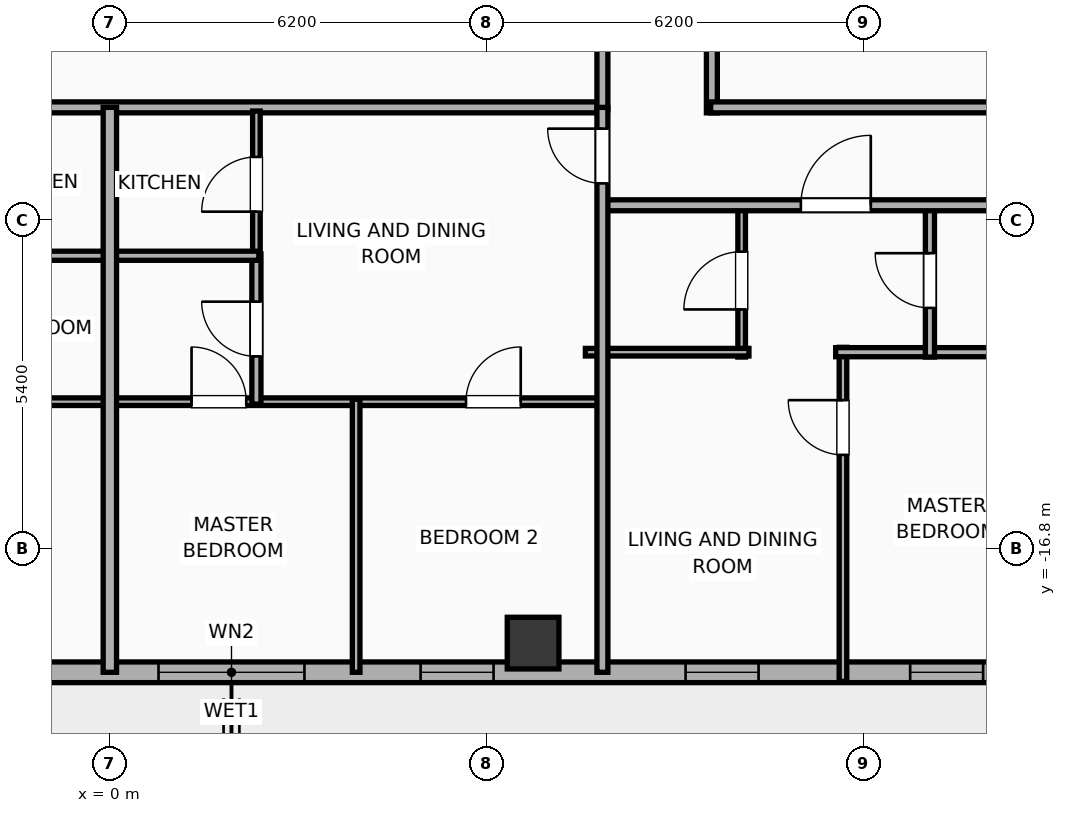
"""IFC4 building model, lengths in metres.
Left out: names, types, materials, properties, quantities, classifications, styles, units other than length and angle.
Written with IfcOpenShell. Run it as: python <this file> out.ifc"""

import sys

from ifc_helpers import new_model, si_unit, direction, frame, frame_2d, origin, origin_2d, place, context, subcontext, project, spatial, rectangle, hollow_rectangle, extrude, element, fill, save


model = new_model("IFC4")
c1 = context("Model", 3, precision=1e-05, world=origin(), true_north=direction((0.0, 1.0)))
c2 = subcontext(c1, "Body", "Model", "MODEL_VIEW")
j1 = project(units=[si_unit("LENGTHUNIT", "METRE"), si_unit("PLANEANGLEUNIT", "RADIAN")], contexts=[c1])
p1 = place(None, origin())
s1 = spatial("IfcSite", under=j1, at=p1, CompositionType="ELEMENT")
p2 = place(p1, origin())
s2 = spatial("IfcBuilding", under=s1, at=p2, CompositionType="ELEMENT")
p3 = place(p2, frame((0.0, 0.0, 231.4)))
s3 = spatial("IfcBuildingStorey", under=s2, at=p3, CompositionType="ELEMENT", Elevation=231.4)
p4 = place(p3, frame((6.96, -18.35, 0.0), z_axis=(0.0, 0.0, 1.0), x_axis=(1.0, 0.0, 0.0)))
e1 = element("IfcColumn", 1, at=p4, inside=s3, PredefinedType="COLUMN", context=c2, shape_type="SweptSolid", body=[
    extrude(hollow_rectangle(XDim=0.85, YDim=0.85, WallThickness=0.028, at=origin_2d()), origin(), (0.0, 0.0, 1.0), 3.9),
])
p5 = place(p3, frame((26.783, -18.83, 0.0), z_axis=(0.0, 0.0, 1.0), x_axis=(-1.0, 0.0, 0.0)))
e2 = element("IfcWall", 2, at=p5, inside=s3, PredefinedType="ELEMENTEDWALL", context=c2, shape_type="SweptSolid", body=[
    extrude(rectangle(XDim=49.566, YDim=0.34, at=frame_2d((24.783, 0.0))), origin(), (0.0, 0.0, 1.0), 3.65),
])
p6 = place(p5, frame((23.583, 0.0, 0.75)))
e3 = element("IfcOpeningElement", 3, at=p6, cuts=e2, PredefinedType="OPENING", context=c2, shape_type="SweptSolid", body=[
    extrude(rectangle(XDim=2.4, YDim=2.1, at=frame_2d((1.2, 1.05))), frame((0.0, 0.18, 0.0), z_axis=(0.0, -1.0, 0.0), x_axis=(1.0, 0.0, 0.0)), (0.0, 0.0, 1.0), 0.36),
])
p7 = place(p5, frame((41.756, 0.0, 0.75)))
e4 = element("IfcOpeningElement", 4, at=p7, cuts=e2, PredefinedType="OPENING", context=c2, shape_type="SweptSolid", body=[
    extrude(rectangle(XDim=2.4, YDim=2.1, at=frame_2d((1.2, 1.05))), frame((0.0, 0.18, 0.0), z_axis=(0.0, -1.0, 0.0), x_axis=(1.0, 0.0, 0.0)), (0.0, 0.0, 1.0), 0.36),
])
p8 = place(p5, frame((47.222, 0.0, 0.75)))
e5 = element("IfcOpeningElement", 5, at=p8, cuts=e2, PredefinedType="OPENING", context=c2, shape_type="SweptSolid", body=[
    extrude(rectangle(XDim=1.2, YDim=2.05, at=frame_2d((0.6, 1.025))), frame((0.0, 0.18, 0.0), z_axis=(0.0, -1.0, 0.0), x_axis=(1.0, 0.0, 0.0)), (0.0, 0.0, 1.0), 0.36),
])
p9 = place(p5, frame((45.263, 0.0, 0.75)))
e6 = element("IfcOpeningElement", 6, at=p9, cuts=e2, PredefinedType="OPENING", context=c2, shape_type="SweptSolid", body=[
    extrude(rectangle(XDim=1.2, YDim=2.05, at=frame_2d((0.6, 1.025))), frame((0.0, 0.18, 0.0), z_axis=(0.0, -1.0, 0.0), x_axis=(1.0, 0.0, 0.0)), (0.0, 0.0, 1.0), 0.36),
])
p10 = place(p5, frame((37.289, 0.0, 0.75)))
e7 = element("IfcOpeningElement", 7, at=p10, cuts=e2, PredefinedType="OPENING", context=c2, shape_type="SweptSolid", body=[
    extrude(rectangle(XDim=1.2, YDim=2.05, at=frame_2d((0.6, 1.025))), frame((0.0, 0.18, 0.0), z_axis=(0.0, -1.0, 0.0), x_axis=(1.0, 0.0, 0.0)), (0.0, 0.0, 1.0), 0.36),
])
p11 = place(p5, frame((16.115, 0.0, 0.75)))
e8 = element("IfcOpeningElement", 8, at=p11, cuts=e2, PredefinedType="OPENING", context=c2, shape_type="SweptSolid", body=[
    extrude(rectangle(XDim=1.2, YDim=2.05, at=frame_2d((0.6, 1.025))), frame((0.0, 0.18, 0.0), z_axis=(0.0, -1.0, 0.0), x_axis=(1.0, 0.0, 0.0)), (0.0, 0.0, 1.0), 0.36),
])
p12 = place(p5, frame((12.422, 0.0, 0.75)))
e9 = element("IfcOpeningElement", 9, at=p12, cuts=e2, PredefinedType="OPENING", context=c2, shape_type="SweptSolid", body=[
    extrude(rectangle(XDim=1.2, YDim=2.05, at=frame_2d((0.6, 1.025))), frame((0.0, 0.18, 0.0), z_axis=(0.0, -1.0, 0.0), x_axis=(1.0, 0.0, 0.0)), (0.0, 0.0, 1.0), 0.36),
])
p13 = place(p5, frame((8.01, 0.0, 0.75)))
e10 = element("IfcOpeningElement", 10, at=p13, cuts=e2, PredefinedType="OPENING", context=c2, shape_type="SweptSolid", body=[
    extrude(rectangle(XDim=1.2, YDim=2.05, at=frame_2d((0.6, 1.025))), frame((0.0, 0.18, 0.0), z_axis=(0.0, -1.0, 0.0), x_axis=(1.0, 0.0, 0.0)), (0.0, 0.0, 1.0), 0.36),
])
p14 = place(p5, frame((5.037, 0.0, 0.75)))
e11 = element("IfcOpeningElement", 11, at=p14, cuts=e2, PredefinedType="OPENING", context=c2, shape_type="SweptSolid", body=[
    extrude(rectangle(XDim=1.2, YDim=2.05, at=frame_2d((0.6, 1.025))), frame((0.0, 0.18, 0.0), z_axis=(0.0, -1.0, 0.0), x_axis=(1.0, 0.0, 0.0)), (0.0, 0.0, 1.0), 0.36),
])
p15 = place(p5, frame((1.811, 0.0, 0.75)))
e12 = element("IfcOpeningElement", 12, at=p15, cuts=e2, PredefinedType="OPENING", context=c2, shape_type="SweptSolid", body=[
    extrude(rectangle(XDim=1.2, YDim=2.05, at=frame_2d((0.6, 1.025))), frame((0.0, 0.18, 0.0), z_axis=(0.0, -1.0, 0.0), x_axis=(1.0, 0.0, 0.0)), (0.0, 0.0, 1.0), 0.36),
])
p16 = place(p5, frame((32.253, 0.0, 0.75)))
e13 = element("IfcOpeningElement", 13, at=p16, cuts=e2, PredefinedType="OPENING", context=c2, shape_type="SweptSolid", body=[
    extrude(rectangle(XDim=1.2, YDim=2.05, at=frame_2d((0.6, 1.025))), frame((0.0, 0.18, 0.0), z_axis=(0.0, -1.0, 0.0), x_axis=(1.0, 0.0, 0.0)), (0.0, 0.0, 1.0), 0.36),
])
p17 = place(p5, frame((27.853, 0.0, 0.75)))
e14 = element("IfcOpeningElement", 14, at=p17, cuts=e2, PredefinedType="OPENING", context=c2, shape_type="SweptSolid", body=[
    extrude(rectangle(XDim=1.2, YDim=2.05, at=frame_2d((0.6, 1.025))), frame((0.0, 0.18, 0.0), z_axis=(0.0, -1.0, 0.0), x_axis=(1.0, 0.0, 0.0)), (0.0, 0.0, 1.0), 0.36),
])
p18 = place(p5, frame((20.473, 0.0, 0.75)))
e15 = element("IfcOpeningElement", 15, at=p18, cuts=e2, PredefinedType="OPENING", context=c2, shape_type="SweptSolid", body=[
    extrude(rectangle(XDim=1.2, YDim=2.05, at=frame_2d((0.6, 1.025))), frame((0.0, 0.18, 0.0), z_axis=(0.0, -1.0, 0.0), x_axis=(1.0, 0.0, 0.0)), (0.0, 0.0, 1.0), 0.36),
])
p19 = place(p3, frame((9.9, -9.63, 0.0), z_axis=(0.0, 0.0, 1.0), x_axis=(0.0, 1.0, 0.0)))
e16 = element("IfcWall", 16, at=p19, inside=s3, PredefinedType="PARTITIONING", context=c2, shape_type="SweptSolid", body=[
    extrude(rectangle(XDim=19.26, YDim=0.18, at=frame_2d((9.63, 0.0))), origin(), (0.0, 0.0, 1.0), 3.65),
])
p20 = place(p19, frame((8.117, 0.0, 0.0)))
e17 = element("IfcOpeningElement", 17, at=p20, cuts=e16, PredefinedType="OPENING", context=c2, shape_type="SweptSolid", body=[
    extrude(rectangle(XDim=1.1, YDim=2.05, at=frame_2d((0.55, 1.025))), frame((0.0, 0.1, 0.0), z_axis=(0.0, -1.0, 0.0), x_axis=(1.0, 0.0, 0.0)), (0.0, 0.0, 1.0), 0.2),
])
p21 = place(p3, frame((9.88, -9.54, 0.0), z_axis=(0.0, 0.0, 1.0), x_axis=(1.0, 0.0, 0.0)))
e18 = element("IfcWall", 18, at=p21, inside=s3, PredefinedType="PARTITIONING", context=c2, shape_type="SweptSolid", body=[
    extrude(rectangle(XDim=20.35, YDim=0.18, at=frame_2d((10.175, 0.0))), origin(), (0.0, 0.0, 1.0), 3.65),
])
p22 = place(p3, frame((-8.15, -9.54, 0.0), z_axis=(0.0, 0.0, 1.0), x_axis=(1.0, 0.0, 0.0)))
e19 = element("IfcWall", 19, at=p22, inside=s3, PredefinedType="PARTITIONING", context=c2, shape_type="SweptSolid", body=[
    extrude(rectangle(XDim=16.3, YDim=0.18, at=frame_2d((8.15, 0.0))), origin(), (0.0, 0.0, 1.0), 3.65),
])
p23 = place(p3, frame((8.1, -9.58, 0.0), z_axis=(0.0, 0.0, 1.0), x_axis=(0.0, 1.0, 0.0)))
e20 = element("IfcWall", 20, at=p23, inside=s3, PredefinedType="PARTITIONING", context=c2, shape_type="SweptSolid", body=[
    extrude(rectangle(XDim=19.16, YDim=0.18, at=frame_2d((9.58, 0.0))), origin(), (0.0, 0.0, 1.0), 3.65),
])
p24 = place(p3, frame((12.056, -18.98, 0.0), z_axis=(0.0, 0.0, 1.0), x_axis=(0.0, 1.0, 0.0)))
e21 = element("IfcWall", 21, at=p24, inside=s3, PredefinedType="PARTITIONING", context=c2, shape_type="SweptSolid", body=[
    extrude(rectangle(XDim=5.494, YDim=0.125, at=frame_2d((2.747, 0.0))), origin(), (0.0, 0.0, 1.0), 3.65),
])
p25 = place(p24, frame((3.725, 0.0, 0.0)))
e22 = element("IfcOpeningElement", 22, at=p25, cuts=e21, PredefinedType="OPENING", context=c2, shape_type="SweptSolid", body=[
    extrude(rectangle(XDim=0.9, YDim=2.05, at=frame_2d((0.45, 1.025))), frame((0.0, 0.073, 0.0), z_axis=(0.0, -1.0, 0.0), x_axis=(1.0, 0.0, 0.0)), (0.0, 0.0, 1.0), 0.145),
])
p26 = place(p3, frame((11.936, -13.566, 0.0), z_axis=(0.0, 0.0, 1.0), x_axis=(1.0, 0.0, 0.0)))
e23 = element("IfcWall", 23, at=p26, inside=s3, PredefinedType="PLUMBINGWALL", context=c2, shape_type="SweptSolid", body=[
    extrude(rectangle(XDim=3.79, YDim=0.15, at=frame_2d((1.895, 0.0))), origin(), (0.0, 0.0, 1.0), 3.65),
])
p27 = place(p3, frame((10.39, -13.646, 0.0), z_axis=(0.0, 0.0, 1.0), x_axis=(0.0, 1.0, 0.0)))
e24 = element("IfcWall", 24, at=p27, inside=s3, PredefinedType="PARTITIONING", context=c2, shape_type="SweptSolid", body=[
    extrude(rectangle(XDim=2.516, YDim=0.125, at=frame_2d((1.258, 0.0))), origin(), (0.0, 0.0, 1.0), 3.65),
])
p28 = place(p27, frame((0.783, 0.0, 0.0)))
e25 = element("IfcOpeningElement", 25, at=p28, cuts=e24, PredefinedType="OPENING", context=c2, shape_type="SweptSolid", body=[
    extrude(rectangle(XDim=0.95, YDim=2.05, at=frame_2d((0.475, 1.025))), frame((0.0, 0.073, 0.0), z_axis=(0.0, -1.0, 0.0), x_axis=(1.0, 0.0, 0.0)), (0.0, 0.0, 1.0), 0.145),
])
p29 = place(p3, frame((7.82, -13.566, 0.0), z_axis=(0.0, 0.0, 1.0), x_axis=(1.0, 0.0, 0.0)))
e26 = element("IfcWall", 26, at=p29, inside=s3, PredefinedType="PARTITIONING", context=c2, shape_type="SweptSolid", body=[
    extrude(rectangle(XDim=2.69, YDim=0.125, at=frame_2d((1.345, 0.0))), origin(), (0.0, 0.0, 1.0), 3.65),
])
p30 = place(p3, frame((13.486, -13.646, 0.0), z_axis=(0.0, 0.0, 1.0), x_axis=(0.0, 1.0, 0.0)))
e27 = element("IfcWall", 27, at=p30, inside=s3, PredefinedType="PLUMBINGWALL", context=c2, shape_type="SweptSolid", body=[
    extrude(rectangle(XDim=2.516, YDim=0.15, at=frame_2d((1.258, 0.0))), origin(), (0.0, 0.0, 1.0), 3.65),
])
p31 = place(p30, frame((0.808, 0.0, 0.0)))
e28 = element("IfcOpeningElement", 28, at=p31, cuts=e27, PredefinedType="OPENING", context=c2, shape_type="SweptSolid", body=[
    extrude(rectangle(XDim=0.9, YDim=2.05, at=frame_2d((0.45, 1.025))), frame((0.0, 0.085, 0.0), z_axis=(0.0, -1.0, 0.0), x_axis=(1.0, 0.0, 0.0)), (0.0, 0.0, 1.0), 0.17),
])
p32 = place(p3, frame((8.08, -11.15, 0.0), z_axis=(0.0, 0.0, 1.0), x_axis=(1.0, 0.0, 0.0)))
e29 = element("IfcWall", 29, at=p32, inside=s3, PredefinedType="PARTITIONING", context=c2, shape_type="SweptSolid", body=[
    extrude(rectangle(XDim=22.15, YDim=0.18, at=frame_2d((11.075, 0.0))), origin(), (0.0, 0.0, 1.0), 3.65),
])
p33 = place(p32, frame((3.283, 0.0, 0.0)))
e30 = element("IfcOpeningElement", 30, at=p33, cuts=e29, PredefinedType="OPENING", context=c2, shape_type="SweptSolid", body=[
    extrude(rectangle(XDim=1.15, YDim=2.05, at=frame_2d((0.575, 1.025))), frame((0.0, 0.1, 0.0), z_axis=(0.0, -1.0, 0.0), x_axis=(1.0, 0.0, 0.0)), (0.0, 0.0, 1.0), 0.2),
])
p34 = place(p32, frame((10.668, 0.0, 0.0)))
e31 = element("IfcOpeningElement", 31, at=p34, cuts=e29, PredefinedType="OPENING", context=c2, shape_type="SweptSolid", body=[
    extrude(rectangle(XDim=1.15, YDim=2.05, at=frame_2d((0.575, 1.025))), frame((0.0, 0.1, 0.0), z_axis=(0.0, -1.0, 0.0), x_axis=(1.0, 0.0, 0.0)), (0.0, 0.0, 1.0), 0.2),
])
p35 = place(p32, frame((18.084, 0.0, 0.0)))
e32 = element("IfcOpeningElement", 32, at=p35, cuts=e29, PredefinedType="OPENING", context=c2, shape_type="SweptSolid", body=[
    extrude(rectangle(XDim=1.15, YDim=2.05, at=frame_2d((0.575, 1.025))), frame((0.0, 0.1, 0.0), z_axis=(0.0, -1.0, 0.0), x_axis=(1.0, 0.0, 0.0)), (0.0, 0.0, 1.0), 0.2),
])
p36 = place(p3, frame((-8.08, -14.38, 0.0), z_axis=(0.0, 0.0, 1.0), x_axis=(1.0, 0.0, 0.0)))
e33 = element("IfcWall", 33, at=p36, inside=s3, PredefinedType="PARTITIONING", context=c2, shape_type="SweptSolid", body=[
    extrude(rectangle(XDim=8.06, YDim=0.125, at=frame_2d((4.03, 0.0))), origin(), (0.0, 0.0, 1.0), 3.65),
])
p37 = place(p36, frame((1.323, 0.0, 0.0)))
e34 = element("IfcOpeningElement", 34, at=p37, cuts=e33, PredefinedType="OPENING", context=c2, shape_type="SweptSolid", body=[
    extrude(rectangle(XDim=0.9, YDim=2.05, at=frame_2d((0.45, 1.025))), frame((0.0, 0.073, 0.0), z_axis=(0.0, -1.0, 0.0), x_axis=(1.0, 0.0, 0.0)), (0.0, 0.0, 1.0), 0.145),
])
p38 = place(p36, frame((4.547, 0.0, 0.0)))
e35 = element("IfcOpeningElement", 35, at=p38, cuts=e33, PredefinedType="OPENING", context=c2, shape_type="SweptSolid", body=[
    extrude(rectangle(XDim=0.9, YDim=2.05, at=frame_2d((0.45, 1.025))), frame((0.0, 0.073, 0.0), z_axis=(0.0, -1.0, 0.0), x_axis=(1.0, 0.0, 0.0)), (0.0, 0.0, 1.0), 0.145),
])
p39 = place(p3, frame((-2.45, -11.98, 0.0), z_axis=(0.0, 0.0, 1.0), x_axis=(1.0, 0.0, 0.0)))
e36 = element("IfcWall", 36, at=p39, inside=s3, PredefinedType="PLUMBINGWALL", context=c2, shape_type="SweptSolid", body=[
    extrude(rectangle(XDim=2.43, YDim=0.15, at=frame_2d((1.215, 0.0))), origin(), (0.0, 0.0, 1.0), 3.65),
])
p40 = place(p3, frame((0.02, -14.38, 0.0), z_axis=(0.0, 0.0, 1.0), x_axis=(1.0, 0.0, 0.0)))
e37 = element("IfcWall", 37, at=p40, inside=s3, PredefinedType="PARTITIONING", context=c2, shape_type="SweptSolid", body=[
    extrude(rectangle(XDim=8.06, YDim=0.125, at=frame_2d((4.03, 0.0))), origin(), (0.0, 0.0, 1.0), 3.65),
])
p41 = place(p40, frame((1.323, 0.0, 0.0)))
e38 = element("IfcOpeningElement", 38, at=p41, cuts=e37, PredefinedType="OPENING", context=c2, shape_type="SweptSolid", body=[
    extrude(rectangle(XDim=0.9, YDim=2.05, at=frame_2d((0.45, 1.025))), frame((0.0, 0.073, 0.0), z_axis=(0.0, -1.0, 0.0), x_axis=(1.0, 0.0, 0.0)), (0.0, 0.0, 1.0), 0.145),
])
p42 = place(p40, frame((5.837, 0.0, 0.0)))
e39 = element("IfcOpeningElement", 39, at=p42, cuts=e37, PredefinedType="OPENING", context=c2, shape_type="SweptSolid", body=[
    extrude(rectangle(XDim=0.9, YDim=2.05, at=frame_2d((0.45, 1.025))), frame((0.0, 0.073, 0.0), z_axis=(0.0, -1.0, 0.0), x_axis=(1.0, 0.0, 0.0)), (0.0, 0.0, 1.0), 0.145),
])
p43 = place(p3, frame((2.41, -12.01, 0.0), z_axis=(0.0, 0.0, 1.0), x_axis=(0.0, 1.0, 0.0)))
e40 = element("IfcWall", 40, at=p43, inside=s3, PredefinedType="PARTITIONING", context=c2, shape_type="SweptSolid", body=[
    extrude(rectangle(XDim=2.41, YDim=0.125, at=frame_2d((1.205, 0.0))), origin(), (0.0, 0.0, 1.0), 3.65),
])
p44 = place(p43, frame((0.755, 0.0, 0.0)))
e41 = element("IfcOpeningElement", 41, at=p44, cuts=e40, PredefinedType="OPENING", context=c2, shape_type="SweptSolid", body=[
    extrude(rectangle(XDim=0.9, YDim=2.05, at=frame_2d((0.45, 1.025))), frame((0.0, 0.073, 0.0), z_axis=(0.0, -1.0, 0.0), x_axis=(1.0, 0.0, 0.0)), (0.0, 0.0, 1.0), 0.145),
])
p45 = place(p3, frame((2.41, -14.42, 0.0), z_axis=(0.0, 0.0, 1.0), x_axis=(0.0, 1.0, 0.0)))
e42 = element("IfcWall", 42, at=p45, inside=s3, PredefinedType="PLUMBINGWALL", context=c2, shape_type="SweptSolid", body=[
    extrude(rectangle(XDim=2.47, YDim=0.15, at=frame_2d((1.235, 0.0))), origin(), (0.0, 0.0, 1.0), 3.65),
])
p46 = place(p45, frame((0.785, 0.0, 0.0)))
e43 = element("IfcOpeningElement", 43, at=p46, cuts=e42, PredefinedType="OPENING", context=c2, shape_type="SweptSolid", body=[
    extrude(rectangle(XDim=0.9, YDim=2.05, at=frame_2d((0.45, 1.025))), frame((0.0, 0.085, 0.0), z_axis=(0.0, -1.0, 0.0), x_axis=(1.0, 0.0, 0.0)), (0.0, 0.0, 1.0), 0.17),
])
p47 = place(p3, frame((0.02, -11.98, 0.0), z_axis=(0.0, 0.0, 1.0), x_axis=(1.0, 0.0, 0.0)))
e44 = element("IfcWall", 44, at=p47, inside=s3, PredefinedType="PLUMBINGWALL", context=c2, shape_type="SweptSolid", body=[
    extrude(rectangle(XDim=2.43, YDim=0.15, at=frame_2d((1.215, 0.0))), origin(), (0.0, 0.0, 1.0), 3.65),
])
p48 = place(p3, frame((4.05, -18.83, 0.0), z_axis=(0.0, 0.0, 1.0), x_axis=(0.0, 1.0, 0.0)))
e45 = element("IfcWall", 45, at=p48, inside=s3, PredefinedType="PARTITIONING", context=c2, shape_type="SweptSolid", body=[
    extrude(rectangle(XDim=4.49, YDim=0.125, at=frame_2d((2.245, 0.0))), origin(), (0.0, 0.0, 1.0), 3.65),
])
p49 = place(p3, frame((8.1, -18.83, 0.0), z_axis=(0.0, 0.0, 1.0), x_axis=(0.0, 1.0, 0.0)))
e46 = element("IfcWall", 46, at=p49, inside=s3, PredefinedType="PARTITIONING", context=c2, shape_type="SweptSolid", body=[
    extrude(rectangle(XDim=9.29, YDim=0.18, at=frame_2d((4.645, 0.0))), origin(), (0.0, 0.0, 1.0), 3.65),
])
p50 = place(p49, frame((8.04, 0.0, 0.0)))
e47 = element("IfcOpeningElement", 47, at=p50, cuts=e46, PredefinedType="OPENING", context=c2, shape_type="SweptSolid", body=[
    extrude(rectangle(XDim=0.9, YDim=2.05, at=frame_2d((0.45, 1.025))), frame((0.0, 0.1, 0.0), z_axis=(0.0, -1.0, 0.0), x_axis=(1.0, 0.0, 0.0)), (0.0, 0.0, 1.0), 0.2),
])
p51 = place(p3, frame((0.0, -18.83, 0.0), z_axis=(0.0, 0.0, 1.0), x_axis=(0.0, 1.0, 0.0)))
e48 = element("IfcWall", 48, at=p51, inside=s3, PredefinedType="PARTITIONING", context=c2, shape_type="SweptSolid", body=[
    extrude(rectangle(XDim=9.29, YDim=0.22, at=frame_2d((4.645, 0.0))), origin(), (0.0, 0.0, 1.0), 3.65),
])
p52 = place(p6, origin())
e49 = element("IfcWindow", 49, at=p52, inside=s3, PartitioningType="SINGLE_PANEL", PredefinedType="WINDOW", context=c2, shape_type="SweptSolid", body=[
    extrude(rectangle(XDim=2.4, YDim=2.1, at=frame_2d((1.2, 1.05))), frame((0.0, 0.03, 0.0), z_axis=(0.0, -1.0, 0.0), x_axis=(1.0, 0.0, 0.0)), (0.0, 0.0, 1.0), 0.06),
])
fill(e3, e49)
p53 = place(p11, origin())
e50 = element("IfcWindow", 50, at=p53, inside=s3, PartitioningType="SINGLE_PANEL", PredefinedType="WINDOW", context=c2, shape_type="SweptSolid", body=[
    extrude(rectangle(XDim=1.2, YDim=2.05, at=frame_2d((0.6, 1.025))), frame((0.0, 0.03, 0.0), z_axis=(0.0, -1.0, 0.0), x_axis=(1.0, 0.0, 0.0)), (0.0, 0.0, 1.0), 0.06),
])
fill(e8, e50)
p54 = place(p12, origin())
e51 = element("IfcWindow", 51, at=p54, inside=s3, PartitioningType="SINGLE_PANEL", PredefinedType="WINDOW", context=c2, shape_type="SweptSolid", body=[
    extrude(rectangle(XDim=1.2, YDim=2.05, at=frame_2d((0.6, 1.025))), frame((0.0, 0.03, 0.0), z_axis=(0.0, -1.0, 0.0), x_axis=(1.0, 0.0, 0.0)), (0.0, 0.0, 1.0), 0.06),
])
fill(e9, e51)
p55 = place(p18, origin())
e52 = element("IfcWindow", 52, at=p55, inside=s3, PartitioningType="SINGLE_PANEL", PredefinedType="WINDOW", context=c2, shape_type="SweptSolid", body=[
    extrude(rectangle(XDim=1.2, YDim=2.05, at=frame_2d((0.6, 1.025))), frame((0.0, 0.03, 0.0), z_axis=(0.0, -1.0, 0.0), x_axis=(1.0, 0.0, 0.0)), (0.0, 0.0, 1.0), 0.06),
])
fill(e15, e52)
p56 = place(p25, origin())
e53 = element("IfcDoor", 53, at=p56, inside=s3, OperationType="SINGLE_SWING_RIGHT", PredefinedType="DOOR", context=c2, shape_type="SweptSolid", body=[
    extrude(rectangle(XDim=0.9, YDim=2.05, at=frame_2d((0.45, 1.025))), frame((0.0, 0.025, 0.0), z_axis=(0.0, -1.0, 0.0), x_axis=(1.0, 0.0, 0.0)), (0.0, 0.0, 1.0), 0.05),
])
fill(e22, e53)
p57 = place(p28, origin())
e54 = element("IfcDoor", 54, at=p57, inside=s3, OperationType="SINGLE_SWING_LEFT", PredefinedType="DOOR", context=c2, shape_type="SweptSolid", body=[
    extrude(rectangle(XDim=0.95, YDim=2.05, at=frame_2d((0.475, 1.025))), frame((0.0, 0.025, 0.0), z_axis=(0.0, -1.0, 0.0), x_axis=(1.0, 0.0, 0.0)), (0.0, 0.0, 1.0), 0.05),
])
fill(e25, e54)
p58 = place(p31, origin())
e55 = element("IfcDoor", 55, at=p58, inside=s3, OperationType="SINGLE_SWING_RIGHT", PredefinedType="DOOR", context=c2, shape_type="SweptSolid", body=[
    extrude(rectangle(XDim=0.9, YDim=2.05, at=frame_2d((0.45, 1.025))), frame((0.0, 0.025, 0.0), z_axis=(0.0, -1.0, 0.0), x_axis=(1.0, 0.0, 0.0)), (0.0, 0.0, 1.0), 0.05),
])
fill(e28, e55)
p59 = place(p33, origin())
e56 = element("IfcDoor", 56, at=p59, inside=s3, OperationType="SINGLE_SWING_RIGHT", PredefinedType="DOOR", context=c2, shape_type="SweptSolid", body=[
    extrude(rectangle(XDim=1.15, YDim=2.05, at=frame_2d((0.575, 1.025))), frame((0.0, 0.025, 0.0), z_axis=(0.0, -1.0, 0.0), x_axis=(1.0, 0.0, 0.0)), (0.0, 0.0, 1.0), 0.05),
])
fill(e30, e56)
p60 = place(p41, origin())
e57 = element("IfcDoor", 57, at=p60, inside=s3, OperationType="SINGLE_SWING_LEFT", PredefinedType="DOOR", context=c2, shape_type="SweptSolid", body=[
    extrude(rectangle(XDim=0.9, YDim=2.05, at=frame_2d((0.45, 1.025))), frame((0.0, 0.025, 0.0), z_axis=(0.0, -1.0, 0.0), x_axis=(1.0, 0.0, 0.0)), (0.0, 0.0, 1.0), 0.05),
])
fill(e38, e57)
p61 = place(p42, origin())
e58 = element("IfcDoor", 58, at=p61, inside=s3, OperationType="SINGLE_SWING_RIGHT", PredefinedType="DOOR", context=c2, shape_type="SweptSolid", body=[
    extrude(rectangle(XDim=0.9, YDim=2.05, at=frame_2d((0.45, 1.025))), frame((0.0, 0.025, 0.0), z_axis=(0.0, -1.0, 0.0), x_axis=(1.0, 0.0, 0.0)), (0.0, 0.0, 1.0), 0.05),
])
fill(e39, e58)
p62 = place(p44, origin())
e59 = element("IfcDoor", 59, at=p62, inside=s3, OperationType="SINGLE_SWING_LEFT", PredefinedType="DOOR", context=c2, shape_type="SweptSolid", body=[
    extrude(rectangle(XDim=0.9, YDim=2.05, at=frame_2d((0.45, 1.025))), frame((0.0, 0.025, 0.0), z_axis=(0.0, -1.0, 0.0), x_axis=(1.0, 0.0, 0.0)), (0.0, 0.0, 1.0), 0.05),
])
fill(e41, e59)
p63 = place(p46, origin())
e60 = element("IfcDoor", 60, at=p63, inside=s3, OperationType="SINGLE_SWING_RIGHT", PredefinedType="DOOR", context=c2, shape_type="SweptSolid", body=[
    extrude(rectangle(XDim=0.9, YDim=2.05, at=frame_2d((0.45, 1.025))), frame((0.0, 0.025, 0.0), z_axis=(0.0, -1.0, 0.0), x_axis=(1.0, 0.0, 0.0)), (0.0, 0.0, 1.0), 0.05),
])
fill(e43, e60)
p64 = place(p50, origin())
e61 = element("IfcDoor", 61, at=p64, inside=s3, OperationType="SINGLE_SWING_RIGHT", PredefinedType="DOOR", context=c2, shape_type="SweptSolid", body=[
    extrude(rectangle(XDim=0.9, YDim=2.05, at=frame_2d((0.45, 1.025))), frame((0.0, 0.025, 0.0), z_axis=(0.0, -1.0, 0.0), x_axis=(1.0, 0.0, 0.0)), (0.0, 0.0, 1.0), 0.05),
])
fill(e47, e61)
save(model, sys.argv[1])
